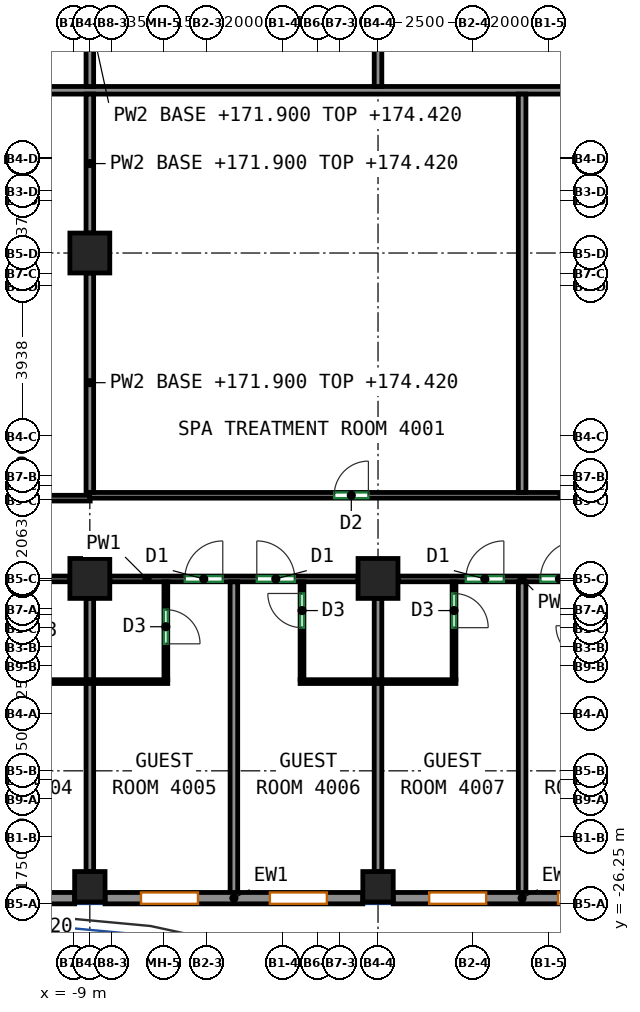
"""IFC4 building model, lengths in metres.
Left out: names, types, materials, properties, quantities, classifications, styles, units other than length and angle.
Written with IfcOpenShell. Run it as: python <this file> out.ifc"""

import sys

from ifc_helpers import new_model, si_unit, direction, frame, frame_2d, origin, origin_2d, place, context, subcontext, project, spatial, rectangle, extrude, source, transform, mapped, element, fill, save


model = new_model("IFC4")
c1 = context("Model", 3, precision=1e-05, world=origin(), true_north=direction((0.0, 1.0)))
c2 = subcontext(c1, "Body", "Model", "MODEL_VIEW")
j1 = project(units=[si_unit("LENGTHUNIT", "METRE"), si_unit("PLANEANGLEUNIT", "RADIAN")], contexts=[c1])
p1 = place(None, origin())
s1 = spatial("IfcSite", under=j1, at=p1, CompositionType="ELEMENT")
p2 = place(p1, origin())
s2 = spatial("IfcBuilding", under=s1, at=p2, CompositionType="ELEMENT")
p3 = place(p2, frame((0.0, 0.0, 171.9)))
s3 = spatial("IfcBuildingStorey", under=s2, at=p3, CompositionType="ELEMENT", Elevation=171.9)
m1 = source(origin(), c2, "Body", "SweptSolid", [
    extrude(rectangle(XDim=0.8, YDim=0.8, at=origin_2d()), origin(), (0.0, 0.0, 1.0), 3.12),
])
p4 = place(p3, frame((-8.583, -25.8, 0.0), z_axis=(0.0, 0.0, 1.0), x_axis=(1.0, 0.0, 0.0)))
e1 = element("IfcColumn", 1, at=p4, inside=s3, PredefinedType="COLUMN", context=c2, shape_type="MappedRepresentation", body=[
    mapped(m1, transform((0.0, 0.0, 0.0))),
])
m2 = source(origin(), c2, "Body", "SweptSolid", [
    extrude(rectangle(XDim=1.05, YDim=1.05, at=origin_2d()), origin(), (0.0, 0.0, 1.0), 3.12),
])
for number, where, z_axis, x_axis in (
    (2, (-8.583, -17.688, 0.0), (0.0, 0.0, 1.0), (1.0, 0.0, 0.0)),
    (3, (-8.583, -9.125, 0.0), (0.0, 0.0, 1.0), (1.0, 0.0, 0.0)),
):
    element("IfcColumn", number, at=place(p3, frame(where, z_axis=z_axis, x_axis=x_axis)), inside=s3, PredefinedType="COLUMN", context=c2, shape_type="MappedRepresentation", body=[
        mapped(m2, transform((0.0, 0.0, 0.0))),
    ])
p5 = place(p3, frame((-1.0, -25.8, 0.0), z_axis=(0.0, 0.0, 1.0), x_axis=(1.0, 0.0, 0.0)))
e4 = element("IfcColumn", 4, at=p5, inside=s3, PredefinedType="COLUMN", context=c2, shape_type="MappedRepresentation", body=[
    mapped(m1, transform((0.0, 0.0, 0.0))),
])
p6 = place(p3, frame((-1.0, -17.688, 0.0), z_axis=(0.0, 0.0, 1.0), x_axis=(1.0, 0.0, 0.0)))
e5 = element("IfcColumn", 5, at=p6, inside=s3, PredefinedType="COLUMN", context=c2, shape_type="MappedRepresentation", body=[
    mapped(m2, transform((0.0, 0.0, 0.0))),
])
m3 = source(origin(), c2, "Body", "SweptSolid", [
    extrude(rectangle(XDim=6.783, YDim=0.3, at=frame_2d((3.392, 0.0))), origin(), (0.0, 0.0, 1.0), 3.12),
])
p7 = place(p3, frame((-15.767, -26.1, 0.0), z_axis=(0.0, 0.0, 1.0), x_axis=(1.0, 0.0, 0.0)))
e6 = element("IfcWall", 6, at=p7, inside=s3, PredefinedType="SOLIDWALL", context=c2, shape_type="MappedRepresentation", body=[
    mapped(m3, transform((0.0, 0.0, 0.0))),
])
p8 = place(p7, frame((0.946, 0.0, 0.85)))
e7 = element("IfcOpeningElement", 7, at=p8, cuts=e6, PredefinedType="OPENING", context=c2, shape_type="SweptSolid", body=[
    extrude(rectangle(XDim=1.5, YDim=1.95, at=frame_2d((0.75, 0.975))), frame((0.0, 0.16, 0.0), z_axis=(0.0, -1.0, 0.0), x_axis=(1.0, 0.0, 0.0)), (0.0, 0.0, 1.0), 0.32),
])
p9 = place(p7, frame((4.338, 0.0, 0.85)))
e8 = element("IfcOpeningElement", 8, at=p9, cuts=e6, PredefinedType="OPENING", context=c2, shape_type="SweptSolid", body=[
    extrude(rectangle(XDim=1.5, YDim=1.95, at=frame_2d((0.75, 0.975))), frame((0.0, 0.16, 0.0), z_axis=(0.0, -1.0, 0.0), x_axis=(1.0, 0.0, 0.0)), (0.0, 0.0, 1.0), 0.32),
])
m4 = source(origin(), c2, "Body", "SweptSolid", [
    extrude(rectangle(XDim=6.783, YDim=0.3, at=frame_2d((3.392, 0.0))), origin(), (0.0, 0.0, 1.0), 3.12),
])
p10 = place(p3, frame((-8.183, -26.1, 0.0), z_axis=(0.0, 0.0, 1.0), x_axis=(1.0, 0.0, 0.0)))
e9 = element("IfcWall", 9, at=p10, inside=s3, PredefinedType="SOLIDWALL", context=c2, shape_type="MappedRepresentation", body=[
    mapped(m4, transform((0.0, 0.0, 0.0))),
])
p11 = place(p10, frame((0.946, 0.0, 0.85)))
e10 = element("IfcOpeningElement", 10, at=p11, cuts=e9, PredefinedType="OPENING", context=c2, shape_type="SweptSolid", body=[
    extrude(rectangle(XDim=1.5, YDim=1.95, at=frame_2d((0.75, 0.975))), frame((0.0, 0.16, 0.0), z_axis=(0.0, -1.0, 0.0), x_axis=(1.0, 0.0, 0.0)), (0.0, 0.0, 1.0), 0.32),
])
p12 = place(p10, frame((4.337, 0.0, 0.85)))
e11 = element("IfcOpeningElement", 11, at=p12, cuts=e9, PredefinedType="OPENING", context=c2, shape_type="SweptSolid", body=[
    extrude(rectangle(XDim=1.5, YDim=1.95, at=frame_2d((0.75, 0.975))), frame((0.0, 0.16, 0.0), z_axis=(0.0, -1.0, 0.0), x_axis=(1.0, 0.0, 0.0)), (0.0, 0.0, 1.0), 0.32),
])
p13 = place(p3, frame((-0.6, -26.1, 0.0), z_axis=(0.0, 0.0, 1.0), x_axis=(1.0, 0.0, 0.0)))
e12 = element("IfcWall", 12, at=p13, inside=s3, PredefinedType="SOLIDWALL", context=c2, shape_type="MappedRepresentation", body=[
    mapped(m4, transform((0.0, 0.0, 0.0))),
])
p14 = place(p13, frame((0.946, 0.0, 0.85)))
e13 = element("IfcOpeningElement", 13, at=p14, cuts=e12, PredefinedType="OPENING", context=c2, shape_type="SweptSolid", body=[
    extrude(rectangle(XDim=1.5, YDim=1.95, at=frame_2d((0.75, 0.975))), frame((0.0, 0.16, 0.0), z_axis=(0.0, -1.0, 0.0), x_axis=(1.0, 0.0, 0.0)), (0.0, 0.0, 1.0), 0.32),
])
p15 = place(p13, frame((4.337, 0.0, 0.85)))
e14 = element("IfcOpeningElement", 14, at=p15, cuts=e12, PredefinedType="OPENING", context=c2, shape_type="SweptSolid", body=[
    extrude(rectangle(XDim=1.5, YDim=1.95, at=frame_2d((0.75, 0.975))), frame((0.0, 0.16, 0.0), z_axis=(0.0, -1.0, 0.0), x_axis=(1.0, 0.0, 0.0)), (0.0, 0.0, 1.0), 0.32),
])
p16 = place(p3, frame((-15.642, -17.7, 0.0), z_axis=(0.0, 0.0, 1.0), x_axis=(1.0, 0.0, 0.0)))
e15 = element("IfcWall", 15, at=p16, inside=s3, PredefinedType="PARTITIONING", context=c2, shape_type="SweptSolid", body=[
    extrude(rectangle(XDim=6.534, YDim=0.15, at=frame_2d((3.267, 0.0))), origin(), (0.0, 0.0, 1.0), 3.12),
])
p17 = place(p16, frame((1.768, 0.0, 0.0)))
e16 = element("IfcOpeningElement", 16, at=p17, cuts=e15, PredefinedType="OPENING", context=c2, shape_type="SweptSolid", body=[
    extrude(rectangle(XDim=1.0, YDim=2.1, at=frame_2d((0.5, 1.05))), frame((0.0, 0.085, 0.0), z_axis=(0.0, -1.0, 0.0), x_axis=(1.0, 0.0, 0.0)), (0.0, 0.0, 1.0), 0.17),
])
p18 = place(p16, frame((3.56, 0.0, 0.0)))
e17 = element("IfcOpeningElement", 17, at=p18, cuts=e15, PredefinedType="OPENING", context=c2, shape_type="SweptSolid", body=[
    extrude(rectangle(XDim=1.0, YDim=2.1, at=frame_2d((0.5, 1.05))), frame((0.0, 0.085, 0.0), z_axis=(0.0, -1.0, 0.0), x_axis=(1.0, 0.0, 0.0)), (0.0, 0.0, 1.0), 0.17),
])
p19 = place(p3, frame((-8.058, -17.7, 0.0), z_axis=(0.0, 0.0, 1.0), x_axis=(1.0, 0.0, 0.0)))
e18 = element("IfcWall", 18, at=p19, inside=s3, PredefinedType="PARTITIONING", context=c2, shape_type="SweptSolid", body=[
    extrude(rectangle(XDim=6.533, YDim=0.15, at=frame_2d((3.267, 0.0))), origin(), (0.0, 0.0, 1.0), 3.12),
])
p20 = place(p19, frame((1.973, 0.0, 0.0)))
e19 = element("IfcOpeningElement", 19, at=p20, cuts=e18, PredefinedType="OPENING", context=c2, shape_type="SweptSolid", body=[
    extrude(rectangle(XDim=1.0, YDim=2.1, at=frame_2d((0.5, 1.05))), frame((0.0, 0.085, 0.0), z_axis=(0.0, -1.0, 0.0), x_axis=(1.0, 0.0, 0.0)), (0.0, 0.0, 1.0), 0.17),
])
p21 = place(p19, frame((3.868, 0.0, 0.0)))
e20 = element("IfcOpeningElement", 20, at=p21, cuts=e18, PredefinedType="OPENING", context=c2, shape_type="SweptSolid", body=[
    extrude(rectangle(XDim=1.0, YDim=2.1, at=frame_2d((0.5, 1.05))), frame((0.0, 0.085, 0.0), z_axis=(0.0, -1.0, 0.0), x_axis=(1.0, 0.0, 0.0)), (0.0, 0.0, 1.0), 0.17),
])
p22 = place(p3, frame((-0.475, -17.7, 0.0), z_axis=(0.0, 0.0, 1.0), x_axis=(1.0, 0.0, 0.0)))
e21 = element("IfcWall", 21, at=p22, inside=s3, PredefinedType="PARTITIONING", context=c2, shape_type="SweptSolid", body=[
    extrude(rectangle(XDim=6.533, YDim=0.15, at=frame_2d((3.267, 0.0))), origin(), (0.0, 0.0, 1.0), 3.12),
])
p23 = place(p22, frame((1.786, 0.0, 0.0)))
e22 = element("IfcOpeningElement", 22, at=p23, cuts=e21, PredefinedType="OPENING", context=c2, shape_type="SweptSolid", body=[
    extrude(rectangle(XDim=1.0, YDim=2.1, at=frame_2d((0.5, 1.05))), frame((0.0, 0.085, 0.0), z_axis=(0.0, -1.0, 0.0), x_axis=(1.0, 0.0, 0.0)), (0.0, 0.0, 1.0), 0.17),
])
p24 = place(p22, frame((3.748, 0.0, 0.0)))
e23 = element("IfcOpeningElement", 23, at=p24, cuts=e21, PredefinedType="OPENING", context=c2, shape_type="SweptSolid", body=[
    extrude(rectangle(XDim=1.0, YDim=2.1, at=frame_2d((0.5, 1.05))), frame((0.0, 0.085, 0.0), z_axis=(0.0, -1.0, 0.0), x_axis=(1.0, 0.0, 0.0)), (0.0, 0.0, 1.0), 0.17),
])
p25 = place(p3, frame((-8.573, -15.575, 0.0), z_axis=(0.0, 0.0, 1.0), x_axis=(-1.0, 0.0, 0.0)))
e24 = element("IfcWall", 24, at=p25, inside=s3, PredefinedType="PARTITIONING", context=c2, shape_type="SweptSolid", body=[
    extrude(rectangle(XDim=4.977, YDim=0.15, at=frame_2d((2.489, 0.0))), origin(), (0.0, 0.0, 1.0), 3.12),
])
p26 = place(p25, frame((3.673, 0.0, 0.0)))
e25 = element("IfcOpeningElement", 25, at=p26, cuts=e24, PredefinedType="OPENING", context=c2, shape_type="SweptSolid", body=[
    extrude(rectangle(XDim=0.9, YDim=2.1, at=frame_2d((0.45, 1.05))), frame((0.0, 0.085, 0.0), z_axis=(0.0, -1.0, 0.0), x_axis=(1.0, 0.0, 0.0)), (0.0, 0.0, 1.0), 0.17),
])
p27 = place(p3, frame((-8.593, -15.5, 0.0), z_axis=(0.0, 0.0, 1.0), x_axis=(1.0, 0.0, 0.0)))
e26 = element("IfcWall", 26, at=p27, inside=s3, PredefinedType="PARTITIONING", context=c2, shape_type="SweptSolid", body=[
    extrude(rectangle(XDim=24.868, YDim=0.15, at=frame_2d((12.434, 0.0))), origin(), (0.0, 0.0, 1.0), 3.12),
])
p28 = place(p27, frame((6.44, 0.0, 0.0)))
e27 = element("IfcOpeningElement", 27, at=p28, cuts=e26, PredefinedType="OPENING", context=c2, shape_type="SweptSolid", body=[
    extrude(rectangle(XDim=0.9, YDim=2.1, at=frame_2d((0.45, 1.05))), frame((0.0, 0.085, 0.0), z_axis=(0.0, -1.0, 0.0), x_axis=(1.0, 0.0, 0.0)), (0.0, 0.0, 1.0), 0.17),
])
p29 = place(p27, frame((16.43, 0.0, 0.0)))
e28 = element("IfcOpeningElement", 28, at=p29, cuts=e26, PredefinedType="OPENING", context=c2, shape_type="SweptSolid", body=[
    extrude(rectangle(XDim=0.9, YDim=2.1, at=frame_2d((0.45, 1.05))), frame((0.0, 0.085, 0.0), z_axis=(0.0, -1.0, 0.0), x_axis=(1.0, 0.0, 0.0)), (0.0, 0.0, 1.0), 0.17),
])
p30 = place(p3, frame((-10.633, -20.402, 0.0), z_axis=(0.0, 0.0, 1.0), x_axis=(1.0, 0.0, 0.0)))
e29 = element("IfcWall", 29, at=p30, inside=s3, PredefinedType="PARTITIONING", context=c2, shape_type="SweptSolid", body=[
    extrude(rectangle(XDim=4.1, YDim=0.1, at=frame_2d((2.05, 0.0))), origin(), (0.0, 0.0, 1.0), 3.12),
])
p31 = place(p3, frame((-8.583, -25.4, 0.0), z_axis=(0.0, 0.0, 1.0), x_axis=(0.0, 1.0, 0.0)))
e30 = element("IfcWall", 30, at=p31, inside=s3, PredefinedType="PARTITIONING", context=c2, shape_type="SweptSolid", body=[
    extrude(rectangle(XDim=4.948, YDim=0.2, at=frame_2d((2.474, 0.0))), origin(), (0.0, 0.0, 1.0), 3.12),
])
p32 = place(p3, frame((-8.583, -20.352, 0.0), z_axis=(0.0, 0.0, 1.0), x_axis=(0.0, 1.0, 0.0)))
e31 = element("IfcWall", 31, at=p32, inside=s3, PredefinedType="PARTITIONING", context=c2, shape_type="SweptSolid", body=[
    extrude(rectangle(XDim=2.14, YDim=0.2, at=frame_2d((1.07, 0.0))), origin(), (0.0, 0.0, 1.0), 3.12),
])
p33 = place(p3, frame((-6.583, -17.777, 0.0), z_axis=(0.0, 0.0, 1.0), x_axis=(0.0, -1.0, 0.0)))
e32 = element("IfcWall", 32, at=p33, inside=s3, PredefinedType="PARTITIONING", context=c2, shape_type="SweptSolid", body=[
    extrude(rectangle(XDim=2.575, YDim=0.1, at=frame_2d((1.288, 0.0))), origin(), (0.0, 0.0, 1.0), 3.12),
])
p34 = place(p33, frame((0.731, 0.0, 0.0)))
e33 = element("IfcOpeningElement", 33, at=p34, cuts=e32, PredefinedType="OPENING", context=c2, shape_type="SweptSolid", body=[
    extrude(rectangle(XDim=0.9, YDim=2.1, at=frame_2d((0.45, 1.05))), frame((0.0, 0.06, 0.0), z_axis=(0.0, -1.0, 0.0), x_axis=(1.0, 0.0, 0.0)), (0.0, 0.0, 1.0), 0.12),
])
p35 = place(p3, frame((-4.792, -26.0, 0.0), z_axis=(0.0, 0.0, 1.0), x_axis=(0.0, 1.0, 0.0)))
e34 = element("IfcWall", 34, at=p35, inside=s3, PredefinedType="PARTITIONING", context=c2, shape_type="SweptSolid", body=[
    extrude(rectangle(XDim=8.223, YDim=0.2, at=frame_2d((4.111, 0.0))), origin(), (0.0, 0.0, 1.0), 3.12),
])
p36 = place(p3, frame((-3.0, -20.352, 0.0), z_axis=(0.0, 0.0, 1.0), x_axis=(0.0, 1.0, 0.0)))
e35 = element("IfcWall", 35, at=p36, inside=s3, PredefinedType="PARTITIONING", context=c2, shape_type="SweptSolid", body=[
    extrude(rectangle(XDim=2.575, YDim=0.1, at=frame_2d((1.288, 0.0))), origin(), (0.0, 0.0, 1.0), 3.12),
])
p37 = place(p36, frame((1.369, 0.0, 0.0)))
e36 = element("IfcOpeningElement", 36, at=p37, cuts=e35, PredefinedType="OPENING", context=c2, shape_type="SweptSolid", body=[
    extrude(rectangle(XDim=0.9, YDim=2.1, at=frame_2d((0.45, 1.05))), frame((0.0, 0.06, 0.0), z_axis=(0.0, -1.0, 0.0), x_axis=(1.0, 0.0, 0.0)), (0.0, 0.0, 1.0), 0.12),
])
p38 = place(p3, frame((-3.05, -20.402, 0.0), z_axis=(0.0, 0.0, 1.0), x_axis=(1.0, 0.0, 0.0)))
e37 = element("IfcWall", 37, at=p38, inside=s3, PredefinedType="PARTITIONING", context=c2, shape_type="SweptSolid", body=[
    extrude(rectangle(XDim=4.1, YDim=0.1, at=frame_2d((2.05, 0.0))), origin(), (0.0, 0.0, 1.0), 3.12),
])
p39 = place(p3, frame((-1.0, -25.4, 0.0), z_axis=(0.0, 0.0, 1.0), x_axis=(0.0, 1.0, 0.0)))
e38 = element("IfcWall", 38, at=p39, inside=s3, PredefinedType="PARTITIONING", context=c2, shape_type="SweptSolid", body=[
    extrude(rectangle(XDim=4.948, YDim=0.2, at=frame_2d((2.474, 0.0))), origin(), (0.0, 0.0, 1.0), 3.12),
])
p40 = place(p3, frame((-1.0, -20.352, 0.0), z_axis=(0.0, 0.0, 1.0), x_axis=(0.0, 1.0, 0.0)))
e39 = element("IfcWall", 39, at=p40, inside=s3, PredefinedType="PARTITIONING", context=c2, shape_type="SweptSolid", body=[
    extrude(rectangle(XDim=2.14, YDim=0.2, at=frame_2d((1.07, 0.0))), origin(), (0.0, 0.0, 1.0), 3.12),
])
p41 = place(p3, frame((1.0, -17.777, 0.0), z_axis=(0.0, 0.0, 1.0), x_axis=(0.0, -1.0, 0.0)))
e40 = element("IfcWall", 40, at=p41, inside=s3, PredefinedType="PARTITIONING", context=c2, shape_type="SweptSolid", body=[
    extrude(rectangle(XDim=2.575, YDim=0.1, at=frame_2d((1.288, 0.0))), origin(), (0.0, 0.0, 1.0), 3.12),
])
p42 = place(p41, frame((0.306, 0.0, 0.0)))
e41 = element("IfcOpeningElement", 41, at=p42, cuts=e40, PredefinedType="OPENING", context=c2, shape_type="SweptSolid", body=[
    extrude(rectangle(XDim=0.9, YDim=2.1, at=frame_2d((0.45, 1.05))), frame((0.0, 0.06, 0.0), z_axis=(0.0, -1.0, 0.0), x_axis=(1.0, 0.0, 0.0)), (0.0, 0.0, 1.0), 0.12),
])
p43 = place(p3, frame((2.792, -26.0, 0.0), z_axis=(0.0, 0.0, 1.0), x_axis=(0.0, 1.0, 0.0)))
e42 = element("IfcWall", 42, at=p43, inside=s3, PredefinedType="PARTITIONING", context=c2, shape_type="SweptSolid", body=[
    extrude(rectangle(XDim=8.223, YDim=0.2, at=frame_2d((4.111, 0.0))), origin(), (0.0, 0.0, 1.0), 3.12),
])
p44 = place(p3, frame((-13.873, -4.843, 0.0), z_axis=(0.0, 0.0, 1.0), x_axis=(1.0, 0.0, 0.0)))
e43 = element("IfcWall", 43, at=p44, inside=s3, PredefinedType="PARTITIONING", context=c2, shape_type="SweptSolid", body=[
    extrude(rectangle(XDim=30.146, YDim=0.2, at=frame_2d((15.073, 0.0))), origin(), (0.0, 0.0, 1.0), 3.12),
])
p45 = place(p3, frame((-8.583, -4.743, 0.0), z_axis=(0.0, 0.0, 1.0), x_axis=(0.0, 1.0, 0.0)))
e44 = element("IfcWall", 44, at=p45, inside=s3, PredefinedType="PARTITIONING", context=c2, shape_type="SweptSolid", body=[
    extrude(rectangle(XDim=3.656, YDim=0.2, at=frame_2d((1.828, 0.0))), origin(), (0.0, 0.0, 1.0), 2.52),
])
p46 = place(p3, frame((-1.0, -4.743, 0.0), z_axis=(0.0, 0.0, 1.0), x_axis=(0.0, 1.0, 0.0)))
e45 = element("IfcWall", 45, at=p46, inside=s3, PredefinedType="PARTITIONING", context=c2, shape_type="SweptSolid", body=[
    extrude(rectangle(XDim=8.366, YDim=0.2, at=frame_2d((4.183, 0.0))), origin(), (0.0, 0.0, 1.0), 3.12),
])
p47 = place(p3, frame((-8.583, -8.6, 0.0), z_axis=(0.0, 0.0, 1.0), x_axis=(0.0, 1.0, 0.0)))
e46 = element("IfcWall", 46, at=p47, inside=s3, PredefinedType="PARTITIONING", context=c2, shape_type="SweptSolid", body=[
    extrude(rectangle(XDim=3.657, YDim=0.2, at=frame_2d((1.829, 0.0))), origin(), (0.0, 0.0, 1.0), 2.52),
])
p48 = place(p3, frame((-8.583, -15.423, 0.0), z_axis=(0.0, 0.0, 1.0), x_axis=(0.0, 1.0, 0.0)))
e47 = element("IfcWall", 47, at=p48, inside=s3, PredefinedType="PARTITIONING", context=c2, shape_type="SweptSolid", body=[
    extrude(rectangle(XDim=5.773, YDim=0.2, at=frame_2d((2.887, 0.0))), origin(), (0.0, 0.0, 1.0), 2.52),
])
p49 = place(p3, frame((2.792, -15.423, 0.0), z_axis=(0.0, 0.0, 1.0), x_axis=(0.0, 1.0, 0.0)))
e48 = element("IfcWall", 48, at=p49, inside=s3, PredefinedType="PARTITIONING", context=c2, shape_type="SweptSolid", body=[
    extrude(rectangle(XDim=10.48, YDim=0.2, at=frame_2d((5.24, 0.0))), origin(), (0.0, 0.0, 1.0), 3.12),
])
p50 = place(p11, origin())
e49 = element("IfcWindow", 49, at=p50, inside=s3, PartitioningType="SINGLE_PANEL", PredefinedType="WINDOW", context=c2, shape_type="SweptSolid", body=[
    extrude(rectangle(XDim=1.5, YDim=1.95, at=frame_2d((0.75, 0.975))), frame((0.0, 0.03, 0.0), z_axis=(0.0, -1.0, 0.0), x_axis=(1.0, 0.0, 0.0)), (0.0, 0.0, 1.0), 0.06),
])
fill(e10, e49)
p51 = place(p12, origin())
e50 = element("IfcWindow", 50, at=p51, inside=s3, PartitioningType="SINGLE_PANEL", PredefinedType="WINDOW", context=c2, shape_type="SweptSolid", body=[
    extrude(rectangle(XDim=1.5, YDim=1.95, at=frame_2d((0.75, 0.975))), frame((0.0, 0.03, 0.0), z_axis=(0.0, -1.0, 0.0), x_axis=(1.0, 0.0, 0.0)), (0.0, 0.0, 1.0), 0.06),
])
fill(e11, e50)
p52 = place(p14, origin())
e51 = element("IfcWindow", 51, at=p52, inside=s3, PartitioningType="SINGLE_PANEL", PredefinedType="WINDOW", context=c2, shape_type="SweptSolid", body=[
    extrude(rectangle(XDim=1.5, YDim=1.95, at=frame_2d((0.75, 0.975))), frame((0.0, 0.03, 0.0), z_axis=(0.0, -1.0, 0.0), x_axis=(1.0, 0.0, 0.0)), (0.0, 0.0, 1.0), 0.06),
])
fill(e13, e51)
p53 = place(p15, origin())
e52 = element("IfcWindow", 52, at=p53, inside=s3, PartitioningType="SINGLE_PANEL", PredefinedType="WINDOW", context=c2, shape_type="SweptSolid", body=[
    extrude(rectangle(XDim=1.5, YDim=1.95, at=frame_2d((0.75, 0.975))), frame((0.0, 0.03, 0.0), z_axis=(0.0, -1.0, 0.0), x_axis=(1.0, 0.0, 0.0)), (0.0, 0.0, 1.0), 0.06),
])
fill(e14, e52)
p54 = place(p34, origin())
e53 = element("IfcDoor", 53, at=p54, inside=s3, OperationType="SINGLE_SWING_RIGHT", PredefinedType="DOOR", context=c2, shape_type="SweptSolid", body=[
    extrude(rectangle(XDim=0.9, YDim=2.1, at=frame_2d((0.45, 1.05))), frame((0.0, 0.025, 0.0), z_axis=(0.0, -1.0, 0.0), x_axis=(1.0, 0.0, 0.0)), (0.0, 0.0, 1.0), 0.05),
])
fill(e33, e53)
p55 = place(p37, origin())
e54 = element("IfcDoor", 54, at=p55, inside=s3, OperationType="SINGLE_SWING_RIGHT", PredefinedType="DOOR", context=c2, shape_type="SweptSolid", body=[
    extrude(rectangle(XDim=0.9, YDim=2.1, at=frame_2d((0.45, 1.05))), frame((0.0, 0.025, 0.0), z_axis=(0.0, -1.0, 0.0), x_axis=(1.0, 0.0, 0.0)), (0.0, 0.0, 1.0), 0.05),
])
fill(e36, e54)
p56 = place(p42, origin())
e55 = element("IfcDoor", 55, at=p56, inside=s3, OperationType="SINGLE_SWING_RIGHT", PredefinedType="DOOR", context=c2, shape_type="SweptSolid", body=[
    extrude(rectangle(XDim=0.9, YDim=2.1, at=frame_2d((0.45, 1.05))), frame((0.0, 0.025, 0.0), z_axis=(0.0, -1.0, 0.0), x_axis=(1.0, 0.0, 0.0)), (0.0, 0.0, 1.0), 0.05),
])
fill(e41, e55)
p57 = place(p20, origin())
e56 = element("IfcDoor", 56, at=p57, inside=s3, OperationType="SINGLE_SWING_RIGHT", PredefinedType="DOOR", context=c2, shape_type="SweptSolid", body=[
    extrude(rectangle(XDim=1.0, YDim=2.1, at=frame_2d((0.5, 1.05))), frame((0.0, 0.025, 0.0), z_axis=(0.0, -1.0, 0.0), x_axis=(1.0, 0.0, 0.0)), (0.0, 0.0, 1.0), 0.05),
])
fill(e19, e56)
p58 = place(p21, origin())
e57 = element("IfcDoor", 57, at=p58, inside=s3, OperationType="SINGLE_SWING_LEFT", PredefinedType="DOOR", context=c2, shape_type="SweptSolid", body=[
    extrude(rectangle(XDim=1.0, YDim=2.1, at=frame_2d((0.5, 1.05))), frame((0.0, 0.025, 0.0), z_axis=(0.0, -1.0, 0.0), x_axis=(1.0, 0.0, 0.0)), (0.0, 0.0, 1.0), 0.05),
])
fill(e20, e57)
p59 = place(p23, origin())
e58 = element("IfcDoor", 58, at=p59, inside=s3, OperationType="SINGLE_SWING_RIGHT", PredefinedType="DOOR", context=c2, shape_type="SweptSolid", body=[
    extrude(rectangle(XDim=1.0, YDim=2.1, at=frame_2d((0.5, 1.05))), frame((0.0, 0.025, 0.0), z_axis=(0.0, -1.0, 0.0), x_axis=(1.0, 0.0, 0.0)), (0.0, 0.0, 1.0), 0.05),
])
fill(e22, e58)
p60 = place(p24, origin())
e59 = element("IfcDoor", 59, at=p60, inside=s3, OperationType="SINGLE_SWING_RIGHT", PredefinedType="DOOR", context=c2, shape_type="SweptSolid", body=[
    extrude(rectangle(XDim=1.0, YDim=2.1, at=frame_2d((0.5, 1.05))), frame((0.0, 0.025, 0.0), z_axis=(0.0, -1.0, 0.0), x_axis=(1.0, 0.0, 0.0)), (0.0, 0.0, 1.0), 0.05),
])
fill(e23, e59)
p61 = place(p28, origin())
e60 = element("IfcDoor", 60, at=p61, inside=s3, OperationType="SINGLE_SWING_RIGHT", PredefinedType="DOOR", context=c2, shape_type="SweptSolid", body=[
    extrude(rectangle(XDim=0.9, YDim=2.1, at=frame_2d((0.45, 1.05))), frame((0.0, 0.025, 0.0), z_axis=(0.0, -1.0, 0.0), x_axis=(1.0, 0.0, 0.0)), (0.0, 0.0, 1.0), 0.05),
])
fill(e27, e60)
save(model, sys.argv[1])
